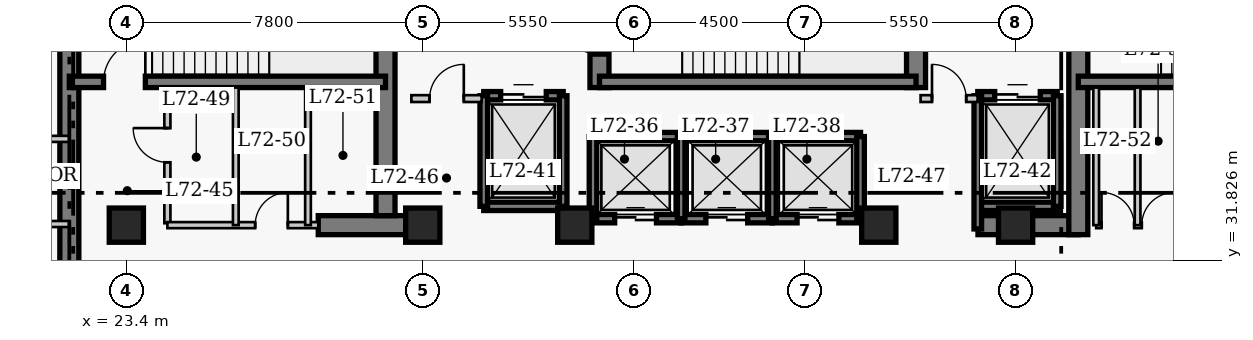
"""IFC4 building model, lengths in metres.
Left out: names, types, materials, properties, quantities, classifications, styles, units other than length and angle.
Written with IfcOpenShell. Run it as: python <this file> out.ifc"""

import sys

from ifc_helpers import new_model, si_unit, direction, frame, frame_2d, origin, origin_2d, place, context, subcontext, project, spatial, rectangle, extrude, element, fill, save


model = new_model("IFC4")
c1 = context("Model", 3, precision=1e-05, world=origin(), true_north=direction((0.0, 1.0)))
c2 = subcontext(c1, "Body", "Model", "MODEL_VIEW")
j1 = project(units=[si_unit("LENGTHUNIT", "METRE"), si_unit("PLANEANGLEUNIT", "RADIAN")], contexts=[c1])
p1 = place(None, origin())
s1 = spatial("IfcSite", under=j1, at=p1, CompositionType="ELEMENT")
p2 = place(p1, origin())
s2 = spatial("IfcBuilding", under=s1, at=p2, CompositionType="ELEMENT")
p3 = place(p2, frame((0.0, 0.0, 289.4)))
s3 = spatial("IfcBuildingStorey", under=s2, at=p3, CompositionType="ELEMENT", Elevation=289.4)
p4 = place(p3, frame((21.9, 27.05, 0.0), z_axis=(0.0, 0.0, 1.0), x_axis=(0.0, 1.0, 0.0)))
e1 = element("IfcWall", 1, at=p4, inside=s3, PredefinedType="SHEAR", context=c2, shape_type="SweptSolid", body=[
    extrude(rectangle(XDim=13.52, YDim=0.5, at=frame_2d((6.76, 0.0))), origin(), (0.0, 0.0, 1.0), 4.0),
])
p5 = place(p3, frame((28.45, 32.75, 0.0), z_axis=(0.0, 0.0, 1.0), x_axis=(1.0, 0.0, 0.0)))
e2 = element("IfcWall", 2, at=p5, inside=s3, PredefinedType="SHEAR", context=c2, shape_type="SweptSolid", body=[
    extrude(rectangle(XDim=2.4, YDim=0.5, at=frame_2d((1.2, 0.0))), origin(), (0.0, 0.0, 1.0), 4.0),
])
p6 = place(p3, frame((45.81, 32.75, 0.0), z_axis=(0.0, 0.0, 1.0), x_axis=(1.0, 0.0, 0.0)))
e3 = element("IfcWall", 3, at=p6, inside=s3, PredefinedType="SHEAR", context=c2, shape_type="SweptSolid", body=[
    extrude(rectangle(XDim=2.64, YDim=0.5, at=frame_2d((1.32, 0.0))), origin(), (0.0, 0.0, 1.0), 4.0),
])
p7 = place(p3, frame((30.22, 33.0, 0.0), z_axis=(0.0, 0.0, 1.0), x_axis=(0.0, 1.0, 0.0)))
e4 = element("IfcWall", 4, at=p7, inside=s3, PredefinedType="SHEAR", context=c2, shape_type="SweptSolid", body=[
    extrude(rectangle(XDim=7.32, YDim=0.5, at=frame_2d((3.66, 0.0))), origin(), (0.0, 0.0, 1.0), 4.0),
])
p8 = place(p3, frame((35.85, 36.37, 0.0), z_axis=(0.0, 0.0, 1.0), x_axis=(0.0, 1.0, 0.0)))
e5 = element("IfcWall", 5, at=p8, inside=s3, PredefinedType="SHEAR", context=c2, shape_type="SweptSolid", body=[
    extrude(rectangle(XDim=3.95, YDim=0.5, at=frame_2d((1.975, 0.0))), origin(), (0.0, 0.0, 1.0), 4.0),
])
p9 = place(p8, frame((0.88, 0.0, 0.0)))
e6 = element("IfcOpeningElement", 6, at=p9, cuts=e5, PredefinedType="OPENING", context=c2, shape_type="SweptSolid", body=[
    extrude(rectangle(XDim=1.1, YDim=2.15, at=frame_2d((0.55, 1.075))), frame((0.0, 0.26, 0.0), z_axis=(0.0, -1.0, 0.0), x_axis=(1.0, 0.0, 0.0)), (0.0, 0.0, 1.0), 0.52),
])
p10 = place(p3, frame((44.18, 36.37, 0.0), z_axis=(0.0, 0.0, 1.0), x_axis=(0.0, 1.0, 0.0)))
e7 = element("IfcWall", 7, at=p10, inside=s3, PredefinedType="SHEAR", context=c2, shape_type="SweptSolid", body=[
    extrude(rectangle(XDim=3.95, YDim=0.5, at=frame_2d((1.975, 0.0))), origin(), (0.0, 0.0, 1.0), 4.0),
])
p11 = place(p3, frame((48.45, 32.5, 0.0), z_axis=(0.0, 0.0, 1.0), x_axis=(0.0, 1.0, 0.0)))
e8 = element("IfcWall", 8, at=p11, inside=s3, PredefinedType="SHEAR", context=c2, shape_type="SweptSolid", body=[
    extrude(rectangle(XDim=7.82, YDim=0.5, at=frame_2d((3.91, 0.0))), origin(), (0.0, 0.0, 1.0), 4.0),
])
p12 = place(p11, frame((5.7, 0.0, 0.0)))
e9 = element("IfcOpeningElement", 9, at=p12, cuts=e8, PredefinedType="OPENING", context=c2, shape_type="SweptSolid", body=[
    extrude(rectangle(XDim=1.1, YDim=2.15, at=frame_2d((0.55, 1.075))), frame((0.0, 0.26, 0.0), z_axis=(0.0, -1.0, 0.0), x_axis=(1.0, 0.0, 0.0)), (0.0, 0.0, 1.0), 0.52),
])
p13 = place(p3, frame((21.9, 36.52, 0.0), z_axis=(0.0, 0.0, 1.0), x_axis=(1.0, 0.0, 0.0)))
e10 = element("IfcWall", 10, at=p13, inside=s3, PredefinedType="SHEAR", context=c2, shape_type="SweptSolid", body=[
    extrude(rectangle(XDim=8.32, YDim=0.3, at=frame_2d((4.16, 0.0))), origin(), (0.0, 0.0, 1.0), 4.0),
])
p14 = place(p13, frame((0.9, 0.0, 0.0)))
e11 = element("IfcOpeningElement", 11, at=p14, cuts=e10, PredefinedType="OPENING", context=c2, shape_type="SweptSolid", body=[
    extrude(rectangle(XDim=1.1, YDim=2.15, at=frame_2d((0.55, 1.075))), frame((0.0, 0.16, 0.0), z_axis=(0.0, -1.0, 0.0), x_axis=(1.0, 0.0, 0.0)), (0.0, 0.0, 1.0), 0.32),
])
p15 = place(p3, frame((35.85, 36.52, 0.0), z_axis=(0.0, 0.0, 1.0), x_axis=(1.0, 0.0, 0.0)))
e12 = element("IfcWall", 12, at=p15, inside=s3, PredefinedType="SHEAR", context=c2, shape_type="SweptSolid", body=[
    extrude(rectangle(XDim=8.33, YDim=0.3, at=frame_2d((4.165, 0.0))), origin(), (0.0, 0.0, 1.0), 4.0),
])
p16 = place(p3, frame((48.45, 36.52, 0.0), z_axis=(0.0, 0.0, 1.0), x_axis=(1.0, 0.0, 0.0)))
e13 = element("IfcWall", 13, at=p16, inside=s3, PredefinedType="SHEAR", context=c2, shape_type="SweptSolid", body=[
    extrude(rectangle(XDim=8.32, YDim=0.3, at=frame_2d((4.16, 0.0))), origin(), (0.0, 0.0, 1.0), 4.0),
])
for number, where, z_axis, x_axis in (
    (14, (23.4, 32.75, 0.0), (0.0, 0.0, 1.0), (1.0, 0.0, 0.0)),
    (15, (31.2, 32.75, 0.0), (0.0, 0.0, 1.0), (1.0, 0.0, 0.0)),
    (16, (35.2, 32.75, 0.0), (0.0, 0.0, 1.0), (1.0, 0.0, 0.0)),
    (17, (43.2, 32.75, 0.0), (0.0, 0.0, 1.0), (1.0, 0.0, 0.0)),
    (18, (46.8, 32.75, 0.0), (0.0, 0.0, 1.0), (1.0, 0.0, 0.0)),
):
    element("IfcColumn", number, at=place(p3, frame(where, z_axis=z_axis, x_axis=x_axis)), inside=s3, PredefinedType="COLUMN", context=c2, shape_type="SweptSolid", body=[
        extrude(rectangle(XDim=0.9, YDim=0.9, at=origin_2d()), origin(), (0.0, 0.0, 1.0), 4.0),
    ])
p17 = place(p3, frame((35.68, 35.08, 0.0), z_axis=(0.0, 0.0, 1.0), x_axis=(1.0, 0.0, 0.0)))
e19 = element("IfcWall", 19, at=p17, inside=s3, PredefinedType="SHEAR", context=c2, shape_type="SweptSolid", body=[
    extrude(rectangle(XDim=2.32, YDim=0.22, at=frame_2d((1.16, 0.0))), origin(), (0.0, 0.0, 1.0), 4.0),
])
p18 = place(p3, frame((35.68, 32.92, 0.0), z_axis=(0.0, 0.0, 1.0), x_axis=(1.0, 0.0, 0.0)))
e20 = element("IfcWall", 20, at=p18, inside=s3, PredefinedType="SHEAR", context=c2, shape_type="SweptSolid", body=[
    extrude(rectangle(XDim=2.32, YDim=0.22, at=frame_2d((1.16, 0.0))), origin(), (0.0, 0.0, 1.0), 4.0),
])
p19 = place(p18, frame((0.57, 0.0, 0.0)))
e21 = element("IfcOpeningElement", 21, at=p19, cuts=e20, PredefinedType="OPENING", context=c2, shape_type="SweptSolid", body=[
    extrude(rectangle(XDim=1.1, YDim=2.15, at=frame_2d((0.55, 1.075))), frame((0.0, 0.12, 0.0), z_axis=(0.0, -1.0, 0.0), x_axis=(1.0, 0.0, 0.0)), (0.0, 0.0, 1.0), 0.24),
])
p20 = place(p3, frame((35.68, 32.92, 0.0), z_axis=(0.0, 0.0, 1.0), x_axis=(0.0, 1.0, 0.0)))
e22 = element("IfcWall", 22, at=p20, inside=s3, PredefinedType="SHEAR", context=c2, shape_type="SweptSolid", body=[
    extrude(rectangle(XDim=2.16, YDim=0.2, at=frame_2d((1.08, 0.0))), origin(), (0.0, 0.0, 1.0), 4.0),
])
p21 = place(p3, frame((38.0, 35.08, 0.0), z_axis=(0.0, 0.0, 1.0), x_axis=(1.0, 0.0, 0.0)))
e23 = element("IfcWall", 23, at=p21, inside=s3, PredefinedType="SHEAR", context=c2, shape_type="SweptSolid", body=[
    extrude(rectangle(XDim=2.4, YDim=0.22, at=frame_2d((1.2, 0.0))), origin(), (0.0, 0.0, 1.0), 4.0),
])
p22 = place(p3, frame((38.0, 32.92, 0.0), z_axis=(0.0, 0.0, 1.0), x_axis=(1.0, 0.0, 0.0)))
e24 = element("IfcWall", 24, at=p22, inside=s3, PredefinedType="SHEAR", context=c2, shape_type="SweptSolid", body=[
    extrude(rectangle(XDim=2.4, YDim=0.22, at=frame_2d((1.2, 0.0))), origin(), (0.0, 0.0, 1.0), 4.0),
])
p23 = place(p22, frame((0.65, 0.0, 0.0)))
e25 = element("IfcOpeningElement", 25, at=p23, cuts=e24, PredefinedType="OPENING", context=c2, shape_type="SweptSolid", body=[
    extrude(rectangle(XDim=1.1, YDim=2.15, at=frame_2d((0.55, 1.075))), frame((0.0, 0.12, 0.0), z_axis=(0.0, -1.0, 0.0), x_axis=(1.0, 0.0, 0.0)), (0.0, 0.0, 1.0), 0.24),
])
p24 = place(p3, frame((38.0, 32.92, 0.0), z_axis=(0.0, 0.0, 1.0), x_axis=(0.0, 1.0, 0.0)))
e26 = element("IfcWall", 26, at=p24, inside=s3, PredefinedType="SHEAR", context=c2, shape_type="SweptSolid", body=[
    extrude(rectangle(XDim=2.16, YDim=0.2, at=frame_2d((1.08, 0.0))), origin(), (0.0, 0.0, 1.0), 4.0),
])
p25 = place(p3, frame((40.4, 35.08, 0.0), z_axis=(0.0, 0.0, 1.0), x_axis=(1.0, 0.0, 0.0)))
e27 = element("IfcWall", 27, at=p25, inside=s3, PredefinedType="SHEAR", context=c2, shape_type="SweptSolid", body=[
    extrude(rectangle(XDim=2.32, YDim=0.22, at=frame_2d((1.16, 0.0))), origin(), (0.0, 0.0, 1.0), 4.0),
])
p26 = place(p3, frame((40.4, 32.92, 0.0), z_axis=(0.0, 0.0, 1.0), x_axis=(1.0, 0.0, 0.0)))
e28 = element("IfcWall", 28, at=p26, inside=s3, PredefinedType="SHEAR", context=c2, shape_type="SweptSolid", body=[
    extrude(rectangle(XDim=2.32, YDim=0.22, at=frame_2d((1.16, 0.0))), origin(), (0.0, 0.0, 1.0), 4.0),
])
p27 = place(p26, frame((0.65, 0.0, 0.0)))
e29 = element("IfcOpeningElement", 29, at=p27, cuts=e28, PredefinedType="OPENING", context=c2, shape_type="SweptSolid", body=[
    extrude(rectangle(XDim=1.1, YDim=2.15, at=frame_2d((0.55, 1.075))), frame((0.0, 0.12, 0.0), z_axis=(0.0, -1.0, 0.0), x_axis=(1.0, 0.0, 0.0)), (0.0, 0.0, 1.0), 0.24),
])
for number, where, z_axis, x_axis in (
    (30, (40.4, 32.92, 0.0), (0.0, 0.0, 1.0), (0.0, 1.0, 0.0)),
    (31, (42.72, 32.92, 0.0), (0.0, 0.0, 1.0), (0.0, 1.0, 0.0)),
):
    element("IfcWall", number, at=place(p3, frame(where, z_axis=z_axis, x_axis=x_axis)), inside=s3, PredefinedType="SHEAR", context=c2, shape_type="SweptSolid", body=[
        extrude(rectangle(XDim=2.16, YDim=0.2, at=frame_2d((1.08, 0.0))), origin(), (0.0, 0.0, 1.0), 4.0),
    ])
p28 = place(p3, frame((32.805, 36.155, 0.0), z_axis=(0.0, 0.0, 1.0), x_axis=(1.0, 0.0, 0.0)))
e32 = element("IfcWall", 32, at=p28, inside=s3, PredefinedType="SHEAR", context=c2, shape_type="SweptSolid", body=[
    extrude(rectangle(XDim=2.09, YDim=0.22, at=frame_2d((1.045, 0.0))), origin(), (0.0, 0.0, 1.0), 4.0),
])
p29 = place(p28, frame((0.445, 0.0, 0.0)))
e33 = element("IfcOpeningElement", 33, at=p29, cuts=e32, PredefinedType="OPENING", context=c2, shape_type="SweptSolid", body=[
    extrude(rectangle(XDim=1.2, YDim=2.15, at=frame_2d((0.6, 1.075))), frame((0.0, 0.12, 0.0), z_axis=(0.0, -1.0, 0.0), x_axis=(1.0, 0.0, 0.0)), (0.0, 0.0, 1.0), 0.24),
])
p30 = place(p3, frame((32.805, 33.245, 0.0), z_axis=(0.0, 0.0, 1.0), x_axis=(1.0, 0.0, 0.0)))
e34 = element("IfcWall", 34, at=p30, inside=s3, PredefinedType="SHEAR", context=c2, shape_type="SweptSolid", body=[
    extrude(rectangle(XDim=2.09, YDim=0.22, at=frame_2d((1.045, 0.0))), origin(), (0.0, 0.0, 1.0), 4.0),
])
for number, where, z_axis, x_axis in (
    (35, (32.805, 33.245, 0.0), (0.0, 0.0, 1.0), (0.0, 1.0, 0.0)),
    (36, (34.895, 33.245, 0.0), (0.0, 0.0, 1.0), (0.0, 1.0, 0.0)),
):
    element("IfcWall", number, at=place(p3, frame(where, z_axis=z_axis, x_axis=x_axis)), inside=s3, PredefinedType="SHEAR", context=c2, shape_type="SweptSolid", body=[
        extrude(rectangle(XDim=2.91, YDim=0.2, at=frame_2d((1.455, 0.0))), origin(), (0.0, 0.0, 1.0), 4.0),
    ])
p31 = place(p3, frame((45.805, 36.155, 0.0), z_axis=(0.0, 0.0, 1.0), x_axis=(1.0, 0.0, 0.0)))
e37 = element("IfcWall", 37, at=p31, inside=s3, PredefinedType="SHEAR", context=c2, shape_type="SweptSolid", body=[
    extrude(rectangle(XDim=2.09, YDim=0.22, at=frame_2d((1.045, 0.0))), origin(), (0.0, 0.0, 1.0), 4.0),
])
p32 = place(p31, frame((0.445, 0.0, 0.0)))
e38 = element("IfcOpeningElement", 38, at=p32, cuts=e37, PredefinedType="OPENING", context=c2, shape_type="SweptSolid", body=[
    extrude(rectangle(XDim=1.2, YDim=2.15, at=frame_2d((0.6, 1.075))), frame((0.0, 0.12, 0.0), z_axis=(0.0, -1.0, 0.0), x_axis=(1.0, 0.0, 0.0)), (0.0, 0.0, 1.0), 0.24),
])
p33 = place(p3, frame((45.805, 33.245, 0.0), z_axis=(0.0, 0.0, 1.0), x_axis=(1.0, 0.0, 0.0)))
e39 = element("IfcWall", 39, at=p33, inside=s3, PredefinedType="SHEAR", context=c2, shape_type="SweptSolid", body=[
    extrude(rectangle(XDim=2.09, YDim=0.22, at=frame_2d((1.045, 0.0))), origin(), (0.0, 0.0, 1.0), 4.0),
])
p34 = place(p3, frame((45.805, 32.65, 0.0), z_axis=(0.0, 0.0, 1.0), x_axis=(0.0, 1.0, 0.0)))
e40 = element("IfcWall", 40, at=p34, inside=s3, PredefinedType="SHEAR", context=c2, shape_type="SweptSolid", body=[
    extrude(rectangle(XDim=3.505, YDim=0.2, at=frame_2d((1.752, 0.0))), origin(), (0.0, 0.0, 1.0), 4.0),
])
p35 = place(p3, frame((47.895, 33.245, 0.0), z_axis=(0.0, 0.0, 1.0), x_axis=(0.0, 1.0, 0.0)))
e41 = element("IfcWall", 41, at=p35, inside=s3, PredefinedType="SHEAR", context=c2, shape_type="SweptSolid", body=[
    extrude(rectangle(XDim=2.91, YDim=0.2, at=frame_2d((1.455, 0.0))), origin(), (0.0, 0.0, 1.0), 4.0),
])
p36 = place(p3, frame((30.9, 36.08, 0.0), z_axis=(0.0, 0.0, 1.0), x_axis=(1.0, 0.0, 0.0)))
e42 = element("IfcWall", 42, at=p36, inside=s3, PredefinedType="PARTITIONING", context=c2, shape_type="SweptSolid", body=[
    extrude(rectangle(XDim=1.85, YDim=0.18, at=frame_2d((0.925, 0.0))), origin(), (0.0, 0.0, 1.0), 3.76),
])
p37 = place(p36, frame((0.48, 0.0, 0.0)))
e43 = element("IfcOpeningElement", 43, at=p37, cuts=e42, PredefinedType="OPENING", context=c2, shape_type="SweptSolid", body=[
    extrude(rectangle(XDim=0.9, YDim=2.15, at=frame_2d((0.45, 1.075))), frame((0.0, 0.1, 0.0), z_axis=(0.0, -1.0, 0.0), x_axis=(1.0, 0.0, 0.0)), (0.0, 0.0, 1.0), 0.2),
])
p38 = place(p3, frame((44.3, 36.08, 0.0), z_axis=(0.0, 0.0, 1.0), x_axis=(1.0, 0.0, 0.0)))
e44 = element("IfcWall", 44, at=p38, inside=s3, PredefinedType="PARTITIONING", context=c2, shape_type="SweptSolid", body=[
    extrude(rectangle(XDim=1.5, YDim=0.18, at=frame_2d((0.75, 0.0))), origin(), (0.0, 0.0, 1.0), 3.76),
])
p39 = place(p38, frame((0.3, 0.0, 0.0)))
e45 = element("IfcOpeningElement", 45, at=p39, cuts=e44, PredefinedType="OPENING", context=c2, shape_type="SweptSolid", body=[
    extrude(rectangle(XDim=0.9, YDim=2.15, at=frame_2d((0.45, 1.075))), frame((0.0, 0.1, 0.0), z_axis=(0.0, -1.0, 0.0), x_axis=(1.0, 0.0, 0.0)), (0.0, 0.0, 1.0), 0.2),
])
p40 = place(p3, frame((24.48, 32.8, 0.0), z_axis=(0.0, 0.0, 1.0), x_axis=(0.0, 1.0, 0.0)))
e46 = element("IfcWall", 46, at=p40, inside=s3, PredefinedType="PARTITIONING", context=c2, shape_type="SweptSolid", body=[
    extrude(rectangle(XDim=3.57, YDim=0.16, at=frame_2d((1.785, 0.0))), origin(), (0.0, 0.0, 1.0), 3.76),
])
p41 = place(p40, frame((1.604, 0.0, 0.0)))
e47 = element("IfcOpeningElement", 47, at=p41, cuts=e46, PredefinedType="OPENING", context=c2, shape_type="SweptSolid", body=[
    extrude(rectangle(XDim=0.9, YDim=2.1, at=frame_2d((0.45, 1.05))), frame((0.0, 0.09, 0.0), z_axis=(0.0, -1.0, 0.0), x_axis=(1.0, 0.0, 0.0)), (0.0, 0.0, 1.0), 0.18),
])
p42 = place(p3, frame((24.48, 32.75, 0.0), z_axis=(0.0, 0.0, 1.0), x_axis=(1.0, 0.0, 0.0)))
e48 = element("IfcWall", 48, at=p42, inside=s3, PredefinedType="PARTITIONING", context=c2, shape_type="SweptSolid", body=[
    extrude(rectangle(XDim=3.97, YDim=0.16, at=frame_2d((1.985, 0.0))), origin(), (0.0, 0.0, 1.0), 3.76),
])
p43 = place(p42, frame((2.31, 0.0, 0.0)))
e49 = element("IfcOpeningElement", 49, at=p43, cuts=e48, PredefinedType="OPENING", context=c2, shape_type="SweptSolid", body=[
    extrude(rectangle(XDim=0.86, YDim=2.05, at=frame_2d((0.43, 1.025))), frame((0.0, 0.09, 0.0), z_axis=(0.0, -1.0, 0.0), x_axis=(1.0, 0.0, 0.0)), (0.0, 0.0, 1.0), 0.18),
])
p44 = place(p3, frame((48.92, 32.75, 0.0), z_axis=(0.0, 0.0, 1.0), x_axis=(1.0, 0.0, 0.0)))
e50 = element("IfcWall", 50, at=p44, inside=s3, PredefinedType="PARTITIONING", context=c2, shape_type="SweptSolid", body=[
    extrude(rectangle(XDim=2.2, YDim=0.16, at=frame_2d((1.1, 0.0))), origin(), (0.0, 0.0, 1.0), 3.76),
])
p45 = place(p44, frame((0.14, 0.0, 0.0)))
e51 = element("IfcOpeningElement", 51, at=p45, cuts=e50, PredefinedType="OPENING", context=c2, shape_type="SweptSolid", body=[
    extrude(rectangle(XDim=0.86, YDim=2.05, at=frame_2d((0.43, 1.025))), frame((0.0, 0.09, 0.0), z_axis=(0.0, -1.0, 0.0), x_axis=(1.0, 0.0, 0.0)), (0.0, 0.0, 1.0), 0.18),
])
p46 = place(p44, frame((1.2, 0.0, 0.0)))
e52 = element("IfcOpeningElement", 52, at=p46, cuts=e50, PredefinedType="OPENING", context=c2, shape_type="SweptSolid", body=[
    extrude(rectangle(XDim=0.86, YDim=2.05, at=frame_2d((0.43, 1.025))), frame((0.0, 0.09, 0.0), z_axis=(0.0, -1.0, 0.0), x_axis=(1.0, 0.0, 0.0)), (0.0, 0.0, 1.0), 0.18),
])
for number, where, z_axis, x_axis in (
    (53, (48.92, 32.75, 0.0), (0.0, 0.0, 1.0), (0.0, 1.0, 0.0)),
    (54, (26.28, 32.75, 0.0), (0.0, 0.0, 1.0), (0.0, 1.0, 0.0)),
    (55, (28.18, 32.75, 0.0), (0.0, 0.0, 1.0), (0.0, 1.0, 0.0)),
    (56, (50.01, 32.75, 0.0), (0.0, 0.0, 1.0), (0.0, 1.0, 0.0)),
):
    element("IfcWall", number, at=place(p3, frame(where, z_axis=z_axis, x_axis=x_axis)), inside=s3, PredefinedType="PARTITIONING", context=c2, shape_type="SweptSolid", body=[
        extrude(rectangle(XDim=3.62, YDim=0.15, at=frame_2d((1.81, 0.0))), origin(), (0.0, 0.0, 1.0), 3.76),
    ])
for number, where, z_axis, x_axis in (
    (57, (19.96, 35.02, 0.0), (0.0, 0.0, 1.0), (1.0, 0.0, 0.0)),
    (58, (19.96, 32.78, 0.0), (0.0, 0.0, 1.0), (1.0, 0.0, 0.0)),
):
    element("IfcWall", number, at=place(p3, frame(where, z_axis=z_axis, x_axis=x_axis)), inside=s3, PredefinedType="PARTITIONING", context=c2, shape_type="SweptSolid", body=[
        extrude(rectangle(XDim=1.94, YDim=0.16, at=frame_2d((0.97, 0.0))), origin(), (0.0, 0.0, 1.0), 3.76),
    ])
p47 = place(p19, origin())
e59 = element("IfcDoor", 59, at=p47, inside=s3, OperationType="DOUBLE_DOOR_SLIDING", PredefinedType="DOOR", context=c2, shape_type="SweptSolid", body=[
    extrude(rectangle(XDim=1.1, YDim=2.15, at=frame_2d((0.55, 1.075))), frame((0.0, 0.025, 0.0), z_axis=(0.0, -1.0, 0.0), x_axis=(1.0, 0.0, 0.0)), (0.0, 0.0, 1.0), 0.05),
])
fill(e21, e59)
p48 = place(p23, origin())
e60 = element("IfcDoor", 60, at=p48, inside=s3, OperationType="DOUBLE_DOOR_SLIDING", PredefinedType="DOOR", context=c2, shape_type="SweptSolid", body=[
    extrude(rectangle(XDim=1.1, YDim=2.15, at=frame_2d((0.55, 1.075))), frame((0.0, 0.025, 0.0), z_axis=(0.0, -1.0, 0.0), x_axis=(1.0, 0.0, 0.0)), (0.0, 0.0, 1.0), 0.05),
])
fill(e25, e60)
p49 = place(p27, origin())
e61 = element("IfcDoor", 61, at=p49, inside=s3, OperationType="DOUBLE_DOOR_SLIDING", PredefinedType="DOOR", context=c2, shape_type="SweptSolid", body=[
    extrude(rectangle(XDim=1.1, YDim=2.15, at=frame_2d((0.55, 1.075))), frame((0.0, 0.025, 0.0), z_axis=(0.0, -1.0, 0.0), x_axis=(1.0, 0.0, 0.0)), (0.0, 0.0, 1.0), 0.05),
])
fill(e29, e61)
p50 = place(p29, origin())
e62 = element("IfcDoor", 62, at=p50, inside=s3, OperationType="DOUBLE_DOOR_SLIDING", PredefinedType="DOOR", context=c2, shape_type="SweptSolid", body=[
    extrude(rectangle(XDim=1.2, YDim=2.15, at=frame_2d((0.6, 1.075))), frame((0.0, 0.025, 0.0), z_axis=(0.0, -1.0, 0.0), x_axis=(1.0, 0.0, 0.0)), (0.0, 0.0, 1.0), 0.05),
])
fill(e33, e62)
p51 = place(p32, origin())
e63 = element("IfcDoor", 63, at=p51, inside=s3, OperationType="DOUBLE_DOOR_SLIDING", PredefinedType="DOOR", context=c2, shape_type="SweptSolid", body=[
    extrude(rectangle(XDim=1.2, YDim=2.15, at=frame_2d((0.6, 1.075))), frame((0.0, 0.025, 0.0), z_axis=(0.0, -1.0, 0.0), x_axis=(1.0, 0.0, 0.0)), (0.0, 0.0, 1.0), 0.05),
])
fill(e38, e63)
p52 = place(p37, origin())
e64 = element("IfcDoor", 64, at=p52, inside=s3, OperationType="SINGLE_SWING_RIGHT", PredefinedType="DOOR", context=c2, shape_type="SweptSolid", body=[
    extrude(rectangle(XDim=0.9, YDim=2.15, at=frame_2d((0.45, 1.075))), frame((0.0, 0.025, 0.0), z_axis=(0.0, -1.0, 0.0), x_axis=(1.0, 0.0, 0.0)), (0.0, 0.0, 1.0), 0.05),
])
fill(e43, e64)
p53 = place(p39, origin())
e65 = element("IfcDoor", 65, at=p53, inside=s3, OperationType="SINGLE_SWING_LEFT", PredefinedType="DOOR", context=c2, shape_type="SweptSolid", body=[
    extrude(rectangle(XDim=0.9, YDim=2.15, at=frame_2d((0.45, 1.075))), frame((0.0, 0.025, 0.0), z_axis=(0.0, -1.0, 0.0), x_axis=(1.0, 0.0, 0.0)), (0.0, 0.0, 1.0), 0.05),
])
fill(e45, e65)
p54 = place(p41, origin())
e66 = element("IfcDoor", 66, at=p54, inside=s3, OperationType="SINGLE_SWING_RIGHT", PredefinedType="DOOR", context=c2, shape_type="SweptSolid", body=[
    extrude(rectangle(XDim=0.9, YDim=2.1, at=frame_2d((0.45, 1.05))), frame((0.0, 0.025, 0.0), z_axis=(0.0, -1.0, 0.0), x_axis=(1.0, 0.0, 0.0)), (0.0, 0.0, 1.0), 0.05),
])
fill(e47, e66)
p55 = place(p43, origin())
e67 = element("IfcDoor", 67, at=p55, inside=s3, OperationType="SINGLE_SWING_RIGHT", PredefinedType="DOOR", context=c2, shape_type="SweptSolid", body=[
    extrude(rectangle(XDim=0.86, YDim=2.05, at=frame_2d((0.43, 1.025))), frame((0.0, 0.025, 0.0), z_axis=(0.0, -1.0, 0.0), x_axis=(1.0, 0.0, 0.0)), (0.0, 0.0, 1.0), 0.05),
])
fill(e49, e67)
p56 = place(p45, origin())
e68 = element("IfcDoor", 68, at=p56, inside=s3, OperationType="SINGLE_SWING_LEFT", PredefinedType="DOOR", context=c2, shape_type="SweptSolid", body=[
    extrude(rectangle(XDim=0.86, YDim=2.05, at=frame_2d((0.43, 1.025))), frame((0.0, 0.025, 0.0), z_axis=(0.0, -1.0, 0.0), x_axis=(1.0, 0.0, 0.0)), (0.0, 0.0, 1.0), 0.05),
])
fill(e51, e68)
p57 = place(p46, origin())
e69 = element("IfcDoor", 69, at=p57, inside=s3, OperationType="SINGLE_SWING_RIGHT", PredefinedType="DOOR", context=c2, shape_type="SweptSolid", body=[
    extrude(rectangle(XDim=0.86, YDim=2.05, at=frame_2d((0.43, 1.025))), frame((0.0, 0.025, 0.0), z_axis=(0.0, -1.0, 0.0), x_axis=(1.0, 0.0, 0.0)), (0.0, 0.0, 1.0), 0.05),
])
fill(e52, e69)
p58 = place(p14, origin())
e70 = element("IfcDoor", 70, at=p58, inside=s3, OperationType="SINGLE_SWING_RIGHT", PredefinedType="DOOR", context=c2, shape_type="SweptSolid", body=[
    extrude(rectangle(XDim=1.1, YDim=2.15, at=frame_2d((0.55, 1.075))), frame((0.0, 0.025, 0.0), z_axis=(0.0, -1.0, 0.0), x_axis=(1.0, 0.0, 0.0)), (0.0, 0.0, 1.0), 0.05),
])
fill(e11, e70)
p59 = place(p9, origin())
e71 = element("IfcDoor", 71, at=p59, inside=s3, OperationType="SINGLE_SWING_RIGHT", PredefinedType="DOOR", context=c2, shape_type="SweptSolid", body=[
    extrude(rectangle(XDim=1.1, YDim=2.15, at=frame_2d((0.55, 1.075))), frame((0.0, 0.025, 0.0), z_axis=(0.0, -1.0, 0.0), x_axis=(1.0, 0.0, 0.0)), (0.0, 0.0, 1.0), 0.05),
])
fill(e6, e71)
save(model, sys.argv[1])
